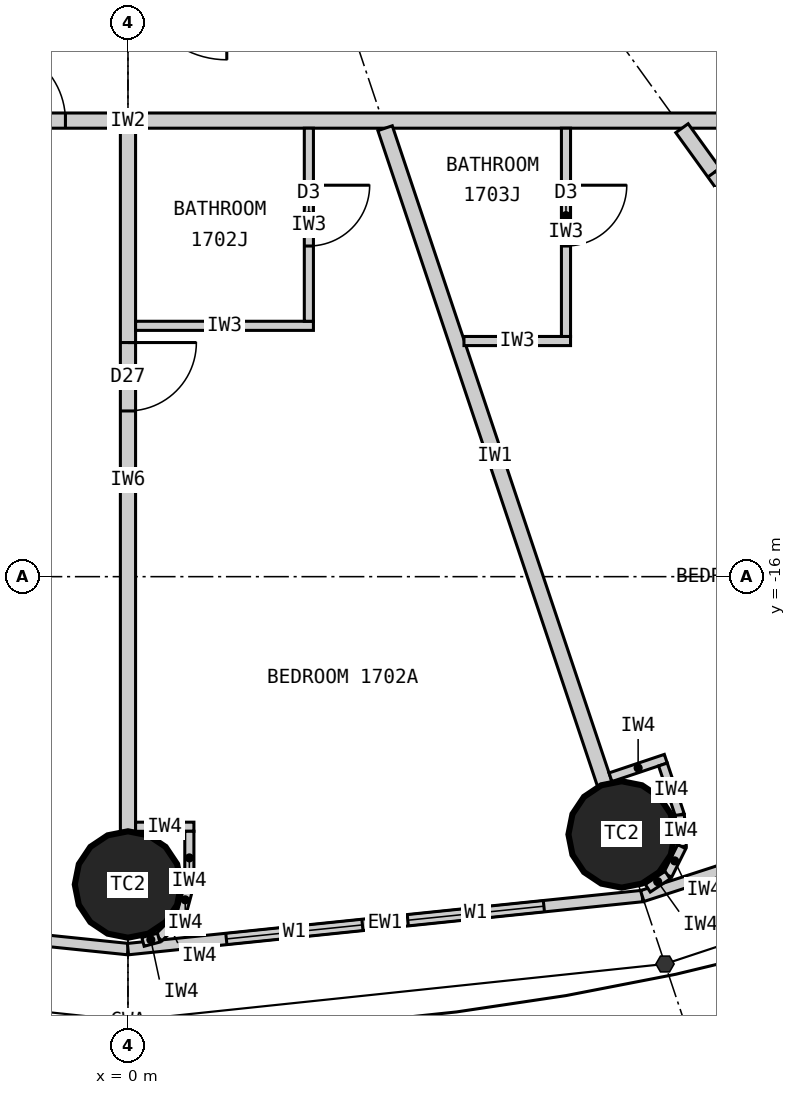
"""IFC4 building model, lengths in metres.
Left out: names, types, materials, properties, quantities, classifications, styles, units other than length and angle.
Written with IfcOpenShell. Run it as: python <this file> out.ifc"""

import sys

from ifc_helpers import new_model, si_unit, direction, frame, frame_2d, origin, origin_2d, place, context, subcontext, project, spatial, rectangle, circle, extrude, element, fill, save


model = new_model("IFC4")
c1 = context("Model", 3, precision=1e-05, world=origin(), true_north=direction((0.0, 1.0)))
c2 = subcontext(c1, "Body", "Model", "MODEL_VIEW")
j1 = project(units=[si_unit("LENGTHUNIT", "METRE"), si_unit("PLANEANGLEUNIT", "RADIAN")], contexts=[c1])
p1 = place(None, origin())
s1 = spatial("IfcSite", under=j1, at=p1, CompositionType="ELEMENT")
p2 = place(p1, origin())
s2 = spatial("IfcBuilding", under=s1, at=p2, CompositionType="ELEMENT")
p3 = place(p2, frame((0.0, 0.0, 70.5)))
s3 = spatial("IfcBuildingStorey", under=s2, at=p3, CompositionType="ELEMENT", Elevation=70.5)
for number, where, z_axis, x_axis in (
    (1, (0.0, -20.05, 0.0), (0.0, 0.0, 1.0), (1.0, 0.0, 0.0)),
    (2, (6.495, -19.391, 0.0), (0.0, 0.0, 1.0), (1.0, 0.0, 0.0)),
):
    element("IfcColumn", number, at=place(p3, frame(where, z_axis=z_axis, x_axis=x_axis)), inside=s3, PredefinedType="COLUMN", context=c2, shape_type="SweptSolid", body=[
        extrude(circle(Radius=0.7, at=origin_2d()), origin(), (0.0, 0.0, 1.0), 3.3),
    ])
p4 = place(p3, frame((-6.766, -20.202, 0.0), z_axis=(0.0, 0.0, 1.0), x_axis=(0.994721394369, -0.102612609291, 0.0)))
e3 = element("IfcWall", 3, at=p4, inside=s3, PredefinedType="ELEMENTEDWALL", context=c2, shape_type="SweptSolid", body=[
    extrude(rectangle(XDim=6.802, YDim=0.15, at=frame_2d((3.401, 0.0))), origin(), (0.0, 0.0, 1.0), 3.12),
])
p5 = place(p4, frame((1.301, 0.0, 0.9)))
e4 = element("IfcOpeningElement", 4, at=p5, cuts=e3, PredefinedType="OPENING", context=c2, shape_type="SweptSolid", body=[
    extrude(rectangle(XDim=1.8, YDim=1.9, at=frame_2d((0.9, 0.95))), frame((0.0, 0.085, 0.0), z_axis=(0.0, -1.0, 0.0), x_axis=(1.0, 0.0, 0.0)), (0.0, 0.0, 1.0), 0.17),
])
p6 = place(p4, frame((3.701, 0.0, 0.9)))
e5 = element("IfcOpeningElement", 5, at=p6, cuts=e3, PredefinedType="OPENING", context=c2, shape_type="SweptSolid", body=[
    extrude(rectangle(XDim=1.8, YDim=1.9, at=frame_2d((0.9, 0.95))), frame((0.0, 0.085, 0.0), z_axis=(0.0, -1.0, 0.0), x_axis=(1.0, 0.0, 0.0)), (0.0, 0.0, 1.0), 0.17),
])
p7 = place(p3, frame((0.0, -20.9, 0.0), z_axis=(0.0, 0.0, 1.0), x_axis=(0.994721394369, 0.102612609291, 0.0)))
e6 = element("IfcWall", 6, at=p7, inside=s3, PredefinedType="ELEMENTEDWALL", context=c2, shape_type="SweptSolid", body=[
    extrude(rectangle(XDim=6.802, YDim=0.15, at=frame_2d((3.401, 0.0))), origin(), (0.0, 0.0, 1.0), 3.12),
])
p8 = place(p7, frame((1.301, 0.0, 0.9)))
e7 = element("IfcOpeningElement", 7, at=p8, cuts=e6, PredefinedType="OPENING", context=c2, shape_type="SweptSolid", body=[
    extrude(rectangle(XDim=1.8, YDim=1.9, at=frame_2d((0.9, 0.95))), frame((0.0, 0.085, 0.0), z_axis=(0.0, -1.0, 0.0), x_axis=(1.0, 0.0, 0.0)), (0.0, 0.0, 1.0), 0.17),
])
p9 = place(p7, frame((3.701, 0.0, 0.9)))
e8 = element("IfcOpeningElement", 8, at=p9, cuts=e6, PredefinedType="OPENING", context=c2, shape_type="SweptSolid", body=[
    extrude(rectangle(XDim=1.8, YDim=1.9, at=frame_2d((0.9, 0.95))), frame((0.0, 0.085, 0.0), z_axis=(0.0, -1.0, 0.0), x_axis=(1.0, 0.0, 0.0)), (0.0, 0.0, 1.0), 0.17),
])
p10 = place(p3, frame((6.766, -20.202, 0.0), z_axis=(0.0, 0.0, 1.0), x_axis=(0.951137534625, 0.308767534285, 0.0)))
e9 = element("IfcWall", 9, at=p10, inside=s3, PredefinedType="ELEMENTEDWALL", context=c2, shape_type="SweptSolid", body=[
    extrude(rectangle(XDim=6.655, YDim=0.15, at=frame_2d((3.328, 0.0))), origin(), (0.0, 0.0, 1.0), 3.12),
])
p11 = place(p10, frame((1.228, 0.0, 0.9)))
e10 = element("IfcOpeningElement", 10, at=p11, cuts=e9, PredefinedType="OPENING", context=c2, shape_type="SweptSolid", body=[
    extrude(rectangle(XDim=1.8, YDim=1.9, at=frame_2d((0.9, 0.95))), frame((0.0, 0.085, 0.0), z_axis=(0.0, -1.0, 0.0), x_axis=(1.0, 0.0, 0.0)), (0.0, 0.0, 1.0), 0.17),
])
p12 = place(p10, frame((3.628, 0.0, 0.9)))
e11 = element("IfcOpeningElement", 11, at=p12, cuts=e9, PredefinedType="OPENING", context=c2, shape_type="SweptSolid", body=[
    extrude(rectangle(XDim=1.8, YDim=1.9, at=frame_2d((0.9, 0.95))), frame((0.0, 0.085, 0.0), z_axis=(0.0, -1.0, 0.0), x_axis=(1.0, 0.0, 0.0)), (0.0, 0.0, 1.0), 0.17),
])
p13 = place(p3, frame((14.1, -10.0, 0.0), z_axis=(0.0, 0.0, 1.0), x_axis=(-1.0, 0.0, 0.0)))
e12 = element("IfcWall", 12, at=p13, inside=s3, PredefinedType="PARTITIONING", context=c2, shape_type="SweptSolid", body=[
    extrude(rectangle(XDim=28.2, YDim=0.2, at=frame_2d((14.1, 0.0))), origin(), (0.0, 0.0, 1.0), 3.12),
])
p14 = place(p13, frame((24.165, 0.0, 0.0)))
e13 = element("IfcOpeningElement", 13, at=p14, cuts=e12, PredefinedType="OPENING", context=c2, shape_type="SweptSolid", body=[
    extrude(rectangle(XDim=1.0, YDim=2.2, at=frame_2d((0.5, 1.1))), frame((0.0, 0.11, 0.0), z_axis=(0.0, -1.0, 0.0), x_axis=(1.0, 0.0, 0.0)), (0.0, 0.0, 1.0), 0.22),
])
p15 = place(p13, frame((14.923, 0.0, 0.0)))
e14 = element("IfcOpeningElement", 14, at=p15, cuts=e12, PredefinedType="OPENING", context=c2, shape_type="SweptSolid", body=[
    extrude(rectangle(XDim=1.0, YDim=2.2, at=frame_2d((0.5, 1.1))), frame((0.0, 0.11, 0.0), z_axis=(0.0, -1.0, 0.0), x_axis=(1.0, 0.0, 0.0)), (0.0, 0.0, 1.0), 0.22),
])
p16 = place(p13, frame((3.035, 0.0, 0.0)))
e15 = element("IfcOpeningElement", 15, at=p16, cuts=e12, PredefinedType="OPENING", context=c2, shape_type="SweptSolid", body=[
    extrude(rectangle(XDim=1.0, YDim=2.2, at=frame_2d((0.5, 1.1))), frame((0.0, 0.11, 0.0), z_axis=(0.0, -1.0, 0.0), x_axis=(1.0, 0.0, 0.0)), (0.0, 0.0, 1.0), 0.22),
])
p17 = place(p3, frame((0.0, -10.1, 0.0), z_axis=(0.0, 0.0, 1.0), x_axis=(0.0, -1.0, 0.0)))
e16 = element("IfcWall", 16, at=p17, inside=s3, PredefinedType="PARTITIONING", context=c2, shape_type="SweptSolid", body=[
    extrude(rectangle(XDim=9.25, YDim=0.2, at=frame_2d((4.625, 0.0))), origin(), (0.0, 0.0, 1.0), 2.32),
])
p18 = place(p17, frame((2.82, 0.0, 0.0)))
e17 = element("IfcOpeningElement", 17, at=p18, cuts=e16, PredefinedType="OPENING", context=c2, shape_type="SweptSolid", body=[
    extrude(rectangle(XDim=0.9, YDim=2.1, at=frame_2d((0.45, 1.05))), frame((0.0, 0.11, 0.0), z_axis=(0.0, -1.0, 0.0), x_axis=(1.0, 0.0, 0.0)), (0.0, 0.0, 1.0), 0.22),
])
p19 = place(p3, frame((3.383, -10.1, 0.0), z_axis=(0.0, 0.0, 1.0), x_axis=(0.31759592231, -0.948226149256, 0.0)))
e18 = element("IfcWall", 18, at=p19, inside=s3, PredefinedType="PARTITIONING", context=c2, shape_type="SweptSolid", body=[
    extrude(rectangle(XDim=9.098, YDim=0.2, at=frame_2d((4.549, 0.0))), origin(), (0.0, 0.0, 1.0), 2.32),
])
p20 = place(p3, frame((7.289, -10.1, 0.0), z_axis=(0.0, 0.0, 1.0), x_axis=(0.585198353053, -0.810890182197, 0.0)))
e19 = element("IfcWall", 19, at=p20, inside=s3, PredefinedType="PARTITIONING", context=c2, shape_type="SweptSolid", body=[
    extrude(rectangle(XDim=8.36, YDim=0.2, at=frame_2d((4.18, 0.0))), origin(), (0.0, 0.0, 1.0), 2.32),
])
p21 = place(p20, frame((0.72, 0.0, 0.0)))
e20 = element("IfcOpeningElement", 20, at=p21, cuts=e19, PredefinedType="OPENING", context=c2, shape_type="SweptSolid", body=[
    extrude(rectangle(XDim=0.9, YDim=2.1, at=frame_2d((0.45, 1.05))), frame((0.0, 0.11, 0.0), z_axis=(0.0, -1.0, 0.0), x_axis=(1.0, 0.0, 0.0)), (0.0, 0.0, 1.0), 0.22),
])
p22 = place(p3, frame((0.1, -12.7, 0.0), z_axis=(0.0, 0.0, 1.0), x_axis=(1.0, 0.0, 0.0)))
e21 = element("IfcWall", 21, at=p22, inside=s3, PredefinedType="PARTITIONING", context=c2, shape_type="SweptSolid", body=[
    extrude(rectangle(XDim=2.34, YDim=0.12, at=frame_2d((1.17, 0.0))), origin(), (0.0, 0.0, 1.0), 3.12),
])
p23 = place(p3, frame((2.38, -10.1, 0.0), z_axis=(0.0, 0.0, 1.0), x_axis=(0.0, -1.0, 0.0)))
e22 = element("IfcWall", 22, at=p23, inside=s3, PredefinedType="PARTITIONING", context=c2, shape_type="SweptSolid", body=[
    extrude(rectangle(XDim=2.54, YDim=0.12, at=frame_2d((1.27, 0.0))), origin(), (0.0, 0.0, 1.0), 3.12),
])
p24 = place(p23, frame((0.75, 0.0, 0.0)))
e23 = element("IfcOpeningElement", 23, at=p24, cuts=e22, PredefinedType="OPENING", context=c2, shape_type="SweptSolid", body=[
    extrude(rectangle(XDim=0.8, YDim=2.1, at=frame_2d((0.4, 1.05))), frame((0.0, 0.07, 0.0), z_axis=(0.0, -1.0, 0.0), x_axis=(1.0, 0.0, 0.0)), (0.0, 0.0, 1.0), 0.14),
])
p25 = place(p3, frame((4.421, -12.9, 0.0), z_axis=(0.0, 0.0, 1.0), x_axis=(1.0, 0.0, 0.0)))
e24 = element("IfcWall", 24, at=p25, inside=s3, PredefinedType="PARTITIONING", context=c2, shape_type="SweptSolid", body=[
    extrude(rectangle(XDim=1.402, YDim=0.12, at=frame_2d((0.701, 0.0))), origin(), (0.0, 0.0, 1.0), 3.12),
])
p26 = place(p3, frame((5.763, -10.1, 0.0), z_axis=(0.0, 0.0, 1.0), x_axis=(0.0, -1.0, 0.0)))
e25 = element("IfcWall", 25, at=p26, inside=s3, PredefinedType="PARTITIONING", context=c2, shape_type="SweptSolid", body=[
    extrude(rectangle(XDim=2.74, YDim=0.12, at=frame_2d((1.37, 0.0))), origin(), (0.0, 0.0, 1.0), 3.12),
])
p27 = place(p26, frame((0.75, 0.0, 0.0)))
e26 = element("IfcOpeningElement", 26, at=p27, cuts=e25, PredefinedType="OPENING", context=c2, shape_type="SweptSolid", body=[
    extrude(rectangle(XDim=0.8, YDim=2.1, at=frame_2d((0.4, 1.05))), frame((0.0, 0.07, 0.0), z_axis=(0.0, -1.0, 0.0), x_axis=(1.0, 0.0, 0.0)), (0.0, 0.0, 1.0), 0.14),
])
p28 = place(p3, frame((0.1, -19.29, 0.0), z_axis=(0.0, 0.0, 1.0), x_axis=(1.0, 0.0, 0.0)))
e27 = element("IfcWall", 27, at=p28, inside=s3, PredefinedType="PARTITIONING", context=c2, shape_type="SweptSolid", body=[
    extrude(rectangle(XDim=0.767, YDim=0.12, at=frame_2d((0.384, 0.0))), origin(), (0.0, 0.0, 1.0), 3.12),
])
p29 = place(p3, frame((0.808, -19.35, 0.0), z_axis=(0.0, 0.0, 1.0), x_axis=(0.0, -1.0, 0.0)))
e28 = element("IfcWall", 28, at=p29, inside=s3, PredefinedType="PARTITIONING", context=c2, shape_type="SweptSolid", body=[
    extrude(rectangle(XDim=0.7, YDim=0.12, at=frame_2d((0.35, 0.0))), origin(), (0.0, 0.0, 1.0), 3.12),
])
p30 = place(p3, frame((0.808, -20.05, 0.0), z_axis=(0.0, 0.0, 1.0), x_axis=(-0.2592614205, -0.965807183573, 0.0)))
e29 = element("IfcWall", 29, at=p30, inside=s3, PredefinedType="PARTITIONING", context=c2, shape_type="SweptSolid", body=[
    extrude(rectangle(XDim=0.418, YDim=0.12, at=frame_2d((0.209, 0.0))), origin(), (0.0, 0.0, 1.0), 3.12),
])
p31 = place(p3, frame((0.699, -20.454, 0.0), z_axis=(0.0, 0.0, 1.0), x_axis=(-0.707106781187, -0.707106781187, 0.0)))
e30 = element("IfcWall", 30, at=p31, inside=s3, PredefinedType="PARTITIONING", context=c2, shape_type="SweptSolid", body=[
    extrude(rectangle(XDim=0.418, YDim=0.12, at=frame_2d((0.209, 0.0))), origin(), (0.0, 0.0, 1.0), 3.12),
])
p32 = place(p3, frame((0.404, -20.749, 0.0), z_axis=(0.0, 0.0, 1.0), x_axis=(-0.965759066438, -0.25944060128, 0.0)))
e31 = element("IfcWall", 31, at=p32, inside=s3, PredefinedType="PARTITIONING", context=c2, shape_type="SweptSolid", body=[
    extrude(rectangle(XDim=0.214, YDim=0.12, at=frame_2d((0.107, 0.0))), origin(), (0.0, 0.0, 1.0), 3.12),
])
p33 = place(p3, frame((6.348, -18.639, 0.0), z_axis=(0.0, 0.0, 1.0), x_axis=(0.948268951266, 0.317468102437, 0.0)))
e32 = element("IfcWall", 32, at=p33, inside=s3, PredefinedType="PARTITIONING", context=c2, shape_type="SweptSolid", body=[
    extrude(rectangle(XDim=0.768, YDim=0.12, at=frame_2d((0.384, 0.0))), origin(), (0.0, 0.0, 1.0), 3.12),
])
p34 = place(p3, frame((7.038, -18.471, 0.0), z_axis=(0.0, 0.0, 1.0), x_axis=(0.317378466199, -0.9482989556, 0.0)))
e33 = element("IfcWall", 33, at=p34, inside=s3, PredefinedType="PARTITIONING", context=c2, shape_type="SweptSolid", body=[
    extrude(rectangle(XDim=0.7, YDim=0.12, at=frame_2d((0.35, 0.0))), origin(), (0.0, 0.0, 1.0), 3.12),
])
p35 = place(p3, frame((7.26, -19.135, 0.0), z_axis=(0.0, 0.0, 1.0), x_axis=(0.0613238046, -0.99811792439, 0.0)))
e34 = element("IfcWall", 34, at=p35, inside=s3, PredefinedType="PARTITIONING", context=c2, shape_type="SweptSolid", body=[
    extrude(rectangle(XDim=0.418, YDim=0.12, at=frame_2d((0.209, 0.0))), origin(), (0.0, 0.0, 1.0), 3.12),
])
p36 = place(p3, frame((7.286, -19.552, 0.0), z_axis=(0.0, 0.0, 1.0), x_axis=(-0.445810757773, -0.89512723579, 0.0)))
e35 = element("IfcWall", 35, at=p36, inside=s3, PredefinedType="PARTITIONING", context=c2, shape_type="SweptSolid", body=[
    extrude(rectangle(XDim=0.418, YDim=0.12, at=frame_2d((0.209, 0.0))), origin(), (0.0, 0.0, 1.0), 3.12),
])
p37 = place(p3, frame((7.1, -19.926, 0.0), z_axis=(0.0, 0.0, 1.0), x_axis=(-0.833488262509, -0.552537162787, 0.0)))
e36 = element("IfcWall", 36, at=p37, inside=s3, PredefinedType="PARTITIONING", context=c2, shape_type="SweptSolid", body=[
    extrude(rectangle(XDim=0.313, YDim=0.12, at=frame_2d((0.156, 0.0))), origin(), (0.0, 0.0, 1.0), 3.12),
])
p38 = place(p8, origin())
e37 = element("IfcWindow", 37, at=p38, inside=s3, PartitioningType="SINGLE_PANEL", PredefinedType="WINDOW", context=c2, shape_type="SweptSolid", body=[
    extrude(rectangle(XDim=1.8, YDim=1.9, at=frame_2d((0.9, 0.95))), frame((0.0, 0.03, 0.0), z_axis=(0.0, -1.0, 0.0), x_axis=(1.0, 0.0, 0.0)), (0.0, 0.0, 1.0), 0.06),
])
fill(e7, e37)
p39 = place(p9, origin())
e38 = element("IfcWindow", 38, at=p39, inside=s3, PartitioningType="SINGLE_PANEL", PredefinedType="WINDOW", context=c2, shape_type="SweptSolid", body=[
    extrude(rectangle(XDim=1.8, YDim=1.9, at=frame_2d((0.9, 0.95))), frame((0.0, 0.03, 0.0), z_axis=(0.0, -1.0, 0.0), x_axis=(1.0, 0.0, 0.0)), (0.0, 0.0, 1.0), 0.06),
])
fill(e8, e38)
p40 = place(p15, origin())
e39 = element("IfcDoor", 39, at=p40, inside=s3, OperationType="SINGLE_SWING_RIGHT", PredefinedType="DOOR", context=c2, shape_type="SweptSolid", body=[
    extrude(rectangle(XDim=1.0, YDim=2.2, at=frame_2d((0.5, 1.1))), frame((0.0, 0.025, 0.0), z_axis=(0.0, -1.0, 0.0), x_axis=(1.0, 0.0, 0.0)), (0.0, 0.0, 1.0), 0.05),
])
fill(e14, e39)
p41 = place(p24, origin())
e40 = element("IfcDoor", 40, at=p41, inside=s3, OperationType="SINGLE_SWING_LEFT", PredefinedType="DOOR", context=c2, shape_type="SweptSolid", body=[
    extrude(rectangle(XDim=0.8, YDim=2.1, at=frame_2d((0.4, 1.05))), frame((0.0, 0.025, 0.0), z_axis=(0.0, -1.0, 0.0), x_axis=(1.0, 0.0, 0.0)), (0.0, 0.0, 1.0), 0.05),
])
fill(e23, e40)
p42 = place(p18, origin())
e41 = element("IfcDoor", 41, at=p42, inside=s3, OperationType="SINGLE_SWING_LEFT", PredefinedType="DOOR", context=c2, shape_type="SweptSolid", body=[
    extrude(rectangle(XDim=0.9, YDim=2.1, at=frame_2d((0.45, 1.05))), frame((0.0, 0.025, 0.0), z_axis=(0.0, -1.0, 0.0), x_axis=(1.0, 0.0, 0.0)), (0.0, 0.0, 1.0), 0.05),
])
fill(e17, e41)
p43 = place(p27, origin())
e42 = element("IfcDoor", 42, at=p43, inside=s3, OperationType="SINGLE_SWING_LEFT", PredefinedType="DOOR", context=c2, shape_type="SweptSolid", body=[
    extrude(rectangle(XDim=0.8, YDim=2.1, at=frame_2d((0.4, 1.05))), frame((0.0, 0.025, 0.0), z_axis=(0.0, -1.0, 0.0), x_axis=(1.0, 0.0, 0.0)), (0.0, 0.0, 1.0), 0.05),
])
fill(e26, e42)
p44 = place(p21, origin())
e43 = element("IfcDoor", 43, at=p44, inside=s3, OperationType="SINGLE_SWING_LEFT", PredefinedType="DOOR", context=c2, shape_type="SweptSolid", body=[
    extrude(rectangle(XDim=0.9, YDim=2.1, at=frame_2d((0.45, 1.05))), frame((0.0, 0.025, 0.0), z_axis=(0.0, -1.0, 0.0), x_axis=(1.0, 0.0, 0.0)), (0.0, 0.0, 1.0), 0.05),
])
fill(e20, e43)
save(model, sys.argv[1])
